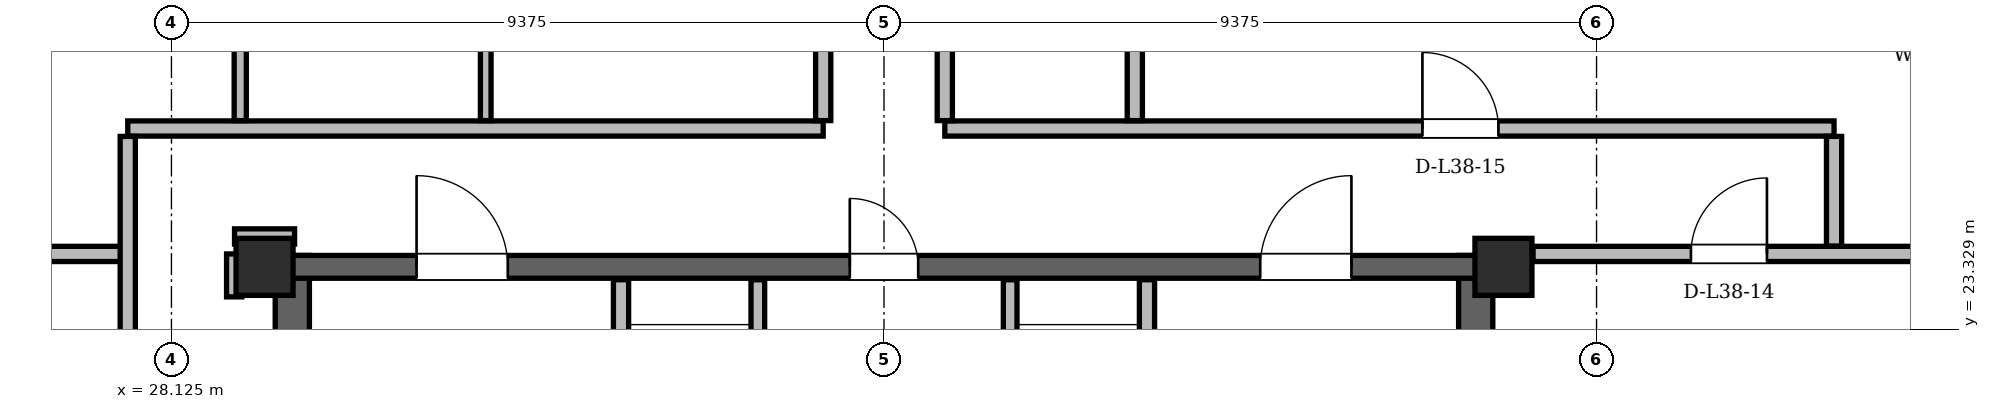
"""IFC4 building model, lengths in metres.
Left out: names, types, materials, properties, quantities, classifications, styles, units other than length and angle.
Written with IfcOpenShell. Run it as: python <this file> out.ifc"""

import sys

from ifc_helpers import new_model, si_unit, direction, frame, frame_2d, origin, origin_2d, place, context, subcontext, project, spatial, rectangle, hollow_rectangle, extrude, element, fill, save


model = new_model("IFC4")
c1 = context("Model", 3, precision=1e-05, world=origin(), true_north=direction((0.0, 1.0)))
c2 = subcontext(c1, "Body", "Model", "MODEL_VIEW")
j1 = project(units=[si_unit("LENGTHUNIT", "METRE"), si_unit("PLANEANGLEUNIT", "RADIAN")], contexts=[c1])
p1 = place(None, origin())
s1 = spatial("IfcSite", under=j1, at=p1, CompositionType="ELEMENT")
p2 = place(p1, origin())
s2 = spatial("IfcBuilding", under=s1, at=p2, CompositionType="ELEMENT")
p3 = place(p2, frame((0.0, 0.0, 145.8)))
s3 = spatial("IfcBuildingStorey", under=s2, at=p3, CompositionType="ELEMENT", Elevation=145.8)
for number, where, z_axis, x_axis in (
    (1, (45.65, 24.15, 0.0), (0.0, 0.0, 1.0), (1.0, 0.0, 0.0)),
    (2, (29.35, 24.15, 0.0), (0.0, 0.0, 1.0), (1.0, 0.0, 0.0)),
):
    element("IfcColumn", number, at=place(p3, frame(where, z_axis=z_axis, x_axis=x_axis)), inside=s3, PredefinedType="COLUMN", context=c2, shape_type="SweptSolid", body=[
        extrude(hollow_rectangle(XDim=0.75, YDim=0.75, WallThickness=0.06, at=origin_2d()), origin(), (0.0, 0.0, 1.0), 3.6),
    ])
for number, where, z_axis, x_axis in (
    (3, (29.715, 11.0, 0.0), (0.0, 0.0, 1.0), (0.0, 1.0, 0.0)),
    (4, (45.285, 11.0, 0.0), (0.0, 0.0, 1.0), (0.0, 1.0, 0.0)),
):
    element("IfcWall", number, at=place(p3, frame(where, z_axis=z_axis, x_axis=x_axis)), inside=s3, PredefinedType="SHEAR", context=c2, shape_type="SweptSolid", body=[
        extrude(rectangle(XDim=13.3, YDim=0.45, at=frame_2d((6.65, 0.0))), origin(), (0.0, 0.0, 1.0), 3.38),
    ])
p4 = place(p3, frame((29.65, 24.15, 0.0), z_axis=(0.0, 0.0, 1.0), x_axis=(1.0, 0.0, 0.0)))
e5 = element("IfcWall", 5, at=p4, inside=s3, PredefinedType="SHEAR", context=c2, shape_type="SweptSolid", body=[
    extrude(rectangle(XDim=15.7, YDim=0.3, at=frame_2d((7.85, 0.0))), origin(), (0.0, 0.0, 1.0), 3.38),
])
p5 = place(p4, frame((1.7, 0.0, 0.0)))
e6 = element("IfcOpeningElement", 6, at=p5, cuts=e5, PredefinedType="OPENING", context=c2, shape_type="SweptSolid", body=[
    extrude(rectangle(XDim=1.2, YDim=2.2, at=frame_2d((0.6, 1.1))), frame((0.0, 0.15, 0.0), z_axis=(0.0, -1.0, 0.0), x_axis=(1.0, 0.0, 0.0)), (0.0, 0.0, 1.0), 0.3),
])
p6 = place(p4, frame((12.8, 0.0, 0.0)))
e7 = element("IfcOpeningElement", 7, at=p6, cuts=e5, PredefinedType="OPENING", context=c2, shape_type="SweptSolid", body=[
    extrude(rectangle(XDim=1.2, YDim=2.2, at=frame_2d((0.6, 1.1))), frame((0.0, 0.15, 0.0), z_axis=(0.0, -1.0, 0.0), x_axis=(1.0, 0.0, 0.0)), (0.0, 0.0, 1.0), 0.3),
])
p7 = place(p4, frame((7.4, 0.0, 0.0)))
e8 = element("IfcOpeningElement", 8, at=p7, cuts=e5, PredefinedType="OPENING", context=c2, shape_type="SweptSolid", body=[
    extrude(rectangle(XDim=0.9, YDim=2.05, at=frame_2d((0.45, 1.025))), frame((0.0, 0.15, 0.0), z_axis=(0.0, -1.0, 0.0), x_axis=(1.0, 0.0, 0.0)), (0.0, 0.0, 1.0), 0.3),
])
p8 = place(p3, frame((60.052, 12.68, 0.0), z_axis=(0.0, 0.0, 1.0), x_axis=(-0.500002412417, 0.86602401097, 0.0)))
e9 = element("IfcWall", 9, at=p8, inside=s3, PredefinedType="SOLIDWALL", context=c2, shape_type="SweptSolid", body=[
    extrude(rectangle(XDim=35.404, YDim=0.34, at=frame_2d((17.702, 0.0))), origin(), (0.0, 0.0, 1.0), 2.6),
])
p9 = place(p8, frame((6.579, 0.0, 0.0)))
e10 = element("IfcOpeningElement", 10, at=p9, cuts=e9, PredefinedType="OPENING", context=c2, shape_type="SweptSolid", body=[
    extrude(rectangle(XDim=1.5, YDim=2.2, at=frame_2d((0.75, 1.1))), frame((0.0, 0.17, 0.0), z_axis=(0.0, -1.0, 0.0), x_axis=(1.0, 0.0, 0.0)), (0.0, 0.0, 1.0), 0.34),
])
p10 = place(p8, frame((25.869, 0.0, 0.0)))
e11 = element("IfcOpeningElement", 11, at=p10, cuts=e9, PredefinedType="OPENING", context=c2, shape_type="SweptSolid", body=[
    extrude(rectangle(XDim=1.5, YDim=2.2, at=frame_2d((0.75, 1.1))), frame((0.0, 0.17, 0.0), z_axis=(0.0, -1.0, 0.0), x_axis=(1.0, 0.0, 0.0)), (0.0, 0.0, 1.0), 0.34),
])
p11 = place(p8, frame((3.702, 0.0, 0.85)))
e12 = element("IfcOpeningElement", 12, at=p11, cuts=e9, PredefinedType="OPENING", context=c2, shape_type="SweptSolid", body=[
    extrude(rectangle(XDim=1.2, YDim=1.48, at=frame_2d((0.6, 0.74))), frame((0.0, 0.17, 0.0), z_axis=(0.0, -1.0, 0.0), x_axis=(1.0, 0.0, 0.0)), (0.0, 0.0, 1.0), 0.34),
])
p12 = place(p8, frame((11.88, 0.0, 0.85)))
e13 = element("IfcOpeningElement", 13, at=p12, cuts=e9, PredefinedType="OPENING", context=c2, shape_type="SweptSolid", body=[
    extrude(rectangle(XDim=1.2, YDim=1.48, at=frame_2d((0.6, 0.74))), frame((0.0, 0.17, 0.0), z_axis=(0.0, -1.0, 0.0), x_axis=(1.0, 0.0, 0.0)), (0.0, 0.0, 1.0), 0.34),
])
p13 = place(p8, frame((15.346, 0.0, 0.85)))
e14 = element("IfcOpeningElement", 14, at=p13, cuts=e9, PredefinedType="OPENING", context=c2, shape_type="SweptSolid", body=[
    extrude(rectangle(XDim=2.8, YDim=1.64, at=frame_2d((1.4, 0.82))), frame((0.0, 0.17, 0.0), z_axis=(0.0, -1.0, 0.0), x_axis=(1.0, 0.0, 0.0)), (0.0, 0.0, 1.0), 0.34),
])
p14 = place(p8, frame((32.288, 0.0, 0.85)))
e15 = element("IfcOpeningElement", 15, at=p14, cuts=e9, PredefinedType="OPENING", context=c2, shape_type="SweptSolid", body=[
    extrude(rectangle(XDim=2.0, YDim=1.64, at=frame_2d((1.0, 0.82))), frame((0.0, 0.17, 0.0), z_axis=(0.0, -1.0, 0.0), x_axis=(1.0, 0.0, 0.0)), (0.0, 0.0, 1.0), 0.34),
])
p15 = place(p3, frame((32.649, 43.341, 0.0), z_axis=(0.0, 0.0, 1.0), x_axis=(-0.500002412417, -0.86602401097, 0.0)))
e16 = element("IfcWall", 16, at=p15, inside=s3, PredefinedType="SOLIDWALL", context=c2, shape_type="SweptSolid", body=[
    extrude(rectangle(XDim=35.404, YDim=0.34, at=frame_2d((17.702, 0.0))), origin(), (0.0, 0.0, 1.0), 2.6),
])
p16 = place(p15, frame((6.579, 0.0, 0.0)))
e17 = element("IfcOpeningElement", 17, at=p16, cuts=e16, PredefinedType="OPENING", context=c2, shape_type="SweptSolid", body=[
    extrude(rectangle(XDim=1.5, YDim=2.2, at=frame_2d((0.75, 1.1))), frame((0.0, 0.17, 0.0), z_axis=(0.0, -1.0, 0.0), x_axis=(1.0, 0.0, 0.0)), (0.0, 0.0, 1.0), 0.34),
])
p17 = place(p15, frame((26.289, 0.0, 0.0)))
e18 = element("IfcOpeningElement", 18, at=p17, cuts=e16, PredefinedType="OPENING", context=c2, shape_type="SweptSolid", body=[
    extrude(rectangle(XDim=1.5, YDim=2.2, at=frame_2d((0.75, 1.1))), frame((0.0, 0.17, 0.0), z_axis=(0.0, -1.0, 0.0), x_axis=(1.0, 0.0, 0.0)), (0.0, 0.0, 1.0), 0.34),
])
p18 = place(p15, frame((22.194, 0.0, 0.85)))
e19 = element("IfcOpeningElement", 19, at=p18, cuts=e16, PredefinedType="OPENING", context=c2, shape_type="SweptSolid", body=[
    extrude(rectangle(XDim=1.2, YDim=1.48, at=frame_2d((0.6, 0.74))), frame((0.0, 0.17, 0.0), z_axis=(0.0, -1.0, 0.0), x_axis=(1.0, 0.0, 0.0)), (0.0, 0.0, 1.0), 0.34),
])
p19 = place(p15, frame((2.317, 0.0, 0.85)))
e20 = element("IfcOpeningElement", 20, at=p19, cuts=e16, PredefinedType="OPENING", context=c2, shape_type="SweptSolid", body=[
    extrude(rectangle(XDim=1.6, YDim=1.64, at=frame_2d((0.8, 0.82))), frame((0.0, 0.17, 0.0), z_axis=(0.0, -1.0, 0.0), x_axis=(1.0, 0.0, 0.0)), (0.0, 0.0, 1.0), 0.34),
])
p20 = place(p15, frame((12.951, 0.0, 0.85)))
e21 = element("IfcOpeningElement", 21, at=p20, cuts=e16, PredefinedType="OPENING", context=c2, shape_type="SweptSolid", body=[
    extrude(rectangle(XDim=3.0, YDim=1.64, at=frame_2d((1.5, 0.82))), frame((0.0, 0.17, 0.0), z_axis=(0.0, -1.0, 0.0), x_axis=(1.0, 0.0, 0.0)), (0.0, 0.0, 1.0), 0.34),
])
p21 = place(p15, frame((20.282, 0.0, 0.85)))
e22 = element("IfcOpeningElement", 22, at=p21, cuts=e16, PredefinedType="OPENING", context=c2, shape_type="SweptSolid", body=[
    extrude(rectangle(XDim=1.2, YDim=1.48, at=frame_2d((0.6, 0.74))), frame((0.0, 0.17, 0.0), z_axis=(0.0, -1.0, 0.0), x_axis=(1.0, 0.0, 0.0)), (0.0, 0.0, 1.0), 0.34),
])
p22 = place(p15, frame((33.524, 0.0, 0.85)))
e23 = element("IfcOpeningElement", 23, at=p22, cuts=e16, PredefinedType="OPENING", context=c2, shape_type="SweptSolid", body=[
    extrude(rectangle(XDim=1.2, YDim=1.48, at=frame_2d((0.6, 0.74))), frame((0.0, 0.17, 0.0), z_axis=(0.0, -1.0, 0.0), x_axis=(1.0, 0.0, 0.0)), (0.0, 0.0, 1.0), 0.34),
])
p23 = place(p3, frame((34.04, 19.48, 0.0), z_axis=(0.0, 0.0, 1.0), x_axis=(0.0, 1.0, 0.0)))
e24 = element("IfcWall", 24, at=p23, inside=s3, PredefinedType="PARTITIONING", context=c2, shape_type="SweptSolid", body=[
    extrude(rectangle(XDim=4.5, YDim=0.2, at=frame_2d((2.25, 0.0))), origin(), (0.0, 0.0, 1.0), 2.42),
])
p24 = place(p23, frame((2.12, 0.0, 0.0)))
e25 = element("IfcOpeningElement", 25, at=p24, cuts=e24, PredefinedType="OPENING", context=c2, shape_type="SweptSolid", body=[
    extrude(rectangle(XDim=1.1, YDim=2.2, at=frame_2d((0.55, 1.1))), frame((0.0, 0.1, 0.0), z_axis=(0.0, -1.0, 0.0), x_axis=(1.0, 0.0, 0.0)), (0.0, 0.0, 1.0), 0.2),
])
p25 = place(p3, frame((35.84, 20.96, 0.0), z_axis=(0.0, 0.0, 1.0), x_axis=(0.0, 1.0, 0.0)))
e26 = element("IfcWall", 26, at=p25, inside=s3, PredefinedType="PARTITIONING", context=c2, shape_type="SweptSolid", body=[
    extrude(rectangle(XDim=3.02, YDim=0.18, at=frame_2d((1.51, 0.0))), origin(), (0.0, 0.0, 1.0), 2.42),
])
p26 = place(p3, frame((40.96, 19.48, 0.0), z_axis=(0.0, 0.0, 1.0), x_axis=(0.0, 1.0, 0.0)))
e27 = element("IfcWall", 27, at=p26, inside=s3, PredefinedType="PARTITIONING", context=c2, shape_type="SweptSolid", body=[
    extrude(rectangle(XDim=4.5, YDim=0.2, at=frame_2d((2.25, 0.0))), origin(), (0.0, 0.0, 1.0), 2.42),
])
p27 = place(p26, frame((2.12, 0.0, 0.0)))
e28 = element("IfcOpeningElement", 28, at=p27, cuts=e27, PredefinedType="OPENING", context=c2, shape_type="SweptSolid", body=[
    extrude(rectangle(XDim=1.1, YDim=2.2, at=frame_2d((0.55, 1.1))), frame((0.0, 0.1, 0.0), z_axis=(0.0, -1.0, 0.0), x_axis=(1.0, 0.0, 0.0)), (0.0, 0.0, 1.0), 0.2),
])
p28 = place(p3, frame((39.16, 20.96, 0.0), z_axis=(0.0, 0.0, 1.0), x_axis=(0.0, 1.0, 0.0)))
e29 = element("IfcWall", 29, at=p28, inside=s3, PredefinedType="PARTITIONING", context=c2, shape_type="SweptSolid", body=[
    extrude(rectangle(XDim=3.02, YDim=0.18, at=frame_2d((1.51, 0.0))), origin(), (0.0, 0.0, 1.0), 2.42),
])
p29 = place(p3, frame((21.869, 24.32, 0.0), z_axis=(0.0, 0.0, 1.0), x_axis=(1.0, 0.0, 0.0)))
e30 = element("IfcWall", 30, at=p29, inside=s3, PredefinedType="PARTITIONING", context=c2, shape_type="SweptSolid", body=[
    extrude(rectangle(XDim=5.681, YDim=0.2, at=frame_2d((2.841, 0.0))), origin(), (0.0, 0.0, 1.0), 3.38),
])
p30 = place(p3, frame((46.04, 24.32, 0.0), z_axis=(0.0, 0.0, 1.0), x_axis=(1.0, 0.0, 0.0)))
e31 = element("IfcWall", 31, at=p30, inside=s3, PredefinedType="PARTITIONING", context=c2, shape_type="SweptSolid", body=[
    extrude(rectangle(XDim=7.091, YDim=0.2, at=frame_2d((3.546, 0.0))), origin(), (0.0, 0.0, 1.0), 3.38),
])
p31 = place(p30, frame((2.077, 0.0, 0.0)))
e32 = element("IfcOpeningElement", 32, at=p31, cuts=e31, PredefinedType="OPENING", context=c2, shape_type="SweptSolid", body=[
    extrude(rectangle(XDim=1.0, YDim=2.18, at=frame_2d((0.5, 1.09))), frame((0.0, 0.1, 0.0), z_axis=(0.0, -1.0, 0.0), x_axis=(1.0, 0.0, 0.0)), (0.0, 0.0, 1.0), 0.2),
])
p32 = place(p3, frame((28.955, 24.55, 0.0), z_axis=(0.0, 0.0, 1.0), x_axis=(1.0, 0.0, 0.0)))
e33 = element("IfcWall", 33, at=p32, inside=s3, PredefinedType="PARTITIONING", context=c2, shape_type="SweptSolid", body=[
    extrude(rectangle(XDim=0.79, YDim=0.2, at=frame_2d((0.395, 0.0))), origin(), (0.0, 0.0, 1.0), 2.842),
])
p33 = place(p3, frame((27.55, 25.97, 0.0), z_axis=(0.0, 0.0, 1.0), x_axis=(1.0, 0.0, 0.0)))
e34 = element("IfcWall", 34, at=p33, inside=s3, PredefinedType="PARTITIONING", context=c2, shape_type="SweptSolid", body=[
    extrude(rectangle(XDim=9.15, YDim=0.2, at=frame_2d((4.575, 0.0))), origin(), (0.0, 0.0, 1.0), 2.842),
])
p34 = place(p3, frame((38.3, 25.97, 0.0), z_axis=(0.0, 0.0, 1.0), x_axis=(1.0, 0.0, 0.0)))
e35 = element("IfcWall", 35, at=p34, inside=s3, PredefinedType="PARTITIONING", context=c2, shape_type="SweptSolid", body=[
    extrude(rectangle(XDim=11.7, YDim=0.2, at=frame_2d((5.85, 0.0))), origin(), (0.0, 0.0, 1.0), 2.842),
])
p35 = place(p34, frame((6.284, 0.0, 0.0)))
e36 = element("IfcOpeningElement", 36, at=p35, cuts=e35, PredefinedType="OPENING", context=c2, shape_type="SweptSolid", body=[
    extrude(rectangle(XDim=1.0, YDim=2.18, at=frame_2d((0.5, 1.09))), frame((0.0, 0.1, 0.0), z_axis=(0.0, -1.0, 0.0), x_axis=(1.0, 0.0, 0.0)), (0.0, 0.0, 1.0), 0.2),
])
p36 = place(p3, frame((27.55, 18.554, 0.0), z_axis=(0.0, 0.0, 1.0), x_axis=(0.0, 1.0, 0.0)))
e37 = element("IfcWall", 37, at=p36, inside=s3, PredefinedType="PARTITIONING", context=c2, shape_type="SweptSolid", body=[
    extrude(rectangle(XDim=7.312, YDim=0.2, at=frame_2d((3.656, 0.0))), origin(), (0.0, 0.0, 1.0), 3.38),
])
p37 = place(p3, frame((28.95, 23.755, 0.0), z_axis=(0.0, 0.0, 1.0), x_axis=(0.0, 1.0, 0.0)))
e38 = element("IfcWall", 38, at=p37, inside=s3, PredefinedType="PARTITIONING", context=c2, shape_type="SweptSolid", body=[
    extrude(rectangle(XDim=0.565, YDim=0.2, at=frame_2d((0.283, 0.0))), origin(), (0.0, 0.0, 1.0), 3.38),
])
p38 = place(p3, frame((29.03, 26.074, 0.0), z_axis=(0.0, 0.0, 1.0), x_axis=(0.0, 1.0, 0.0)))
e39 = element("IfcWall", 39, at=p38, inside=s3, PredefinedType="PARTITIONING", context=c2, shape_type="SweptSolid", body=[
    extrude(rectangle(XDim=1.822, YDim=0.16, at=frame_2d((0.911, 0.0))), origin(), (0.0, 0.0, 1.0), 3.38),
])
p39 = place(p3, frame((32.26, 26.074, 0.0), z_axis=(0.0, 0.0, 1.0), x_axis=(0.0, 1.0, 0.0)))
e40 = element("IfcWall", 40, at=p39, inside=s3, PredefinedType="PARTITIONING", context=c2, shape_type="SweptSolid", body=[
    extrude(rectangle(XDim=1.822, YDim=0.14, at=frame_2d((0.911, 0.0))), origin(), (0.0, 0.0, 1.0), 3.38),
])
p40 = place(p3, frame((36.7, 26.074, 0.0), z_axis=(0.0, 0.0, 1.0), x_axis=(0.0, 1.0, 0.0)))
e41 = element("IfcWall", 41, at=p40, inside=s3, PredefinedType="PARTITIONING", context=c2, shape_type="SweptSolid", body=[
    extrude(rectangle(XDim=17.093, YDim=0.2, at=frame_2d((8.546, 0.0))), origin(), (0.0, 0.0, 1.0), 3.38),
])
p41 = place(p40, frame((7.042, 0.0, 0.0)))
e42 = element("IfcOpeningElement", 42, at=p41, cuts=e41, PredefinedType="OPENING", context=c2, shape_type="SweptSolid", body=[
    extrude(rectangle(XDim=1.0, YDim=2.18, at=frame_2d((0.5, 1.09))), frame((0.0, 0.1, 0.0), z_axis=(0.0, -1.0, 0.0), x_axis=(1.0, 0.0, 0.0)), (0.0, 0.0, 1.0), 0.2),
])
p42 = place(p3, frame((38.3, 26.074, 0.0), z_axis=(0.0, 0.0, 1.0), x_axis=(0.0, 1.0, 0.0)))
e43 = element("IfcWall", 43, at=p42, inside=s3, PredefinedType="PARTITIONING", context=c2, shape_type="SweptSolid", body=[
    extrude(rectangle(XDim=13.422, YDim=0.2, at=frame_2d((6.711, 0.0))), origin(), (0.0, 0.0, 1.0), 3.38),
])
p43 = place(p42, frame((8.527, 0.0, 0.0)))
e44 = element("IfcOpeningElement", 44, at=p43, cuts=e43, PredefinedType="OPENING", context=c2, shape_type="SweptSolid", body=[
    extrude(rectangle(XDim=1.0, YDim=2.18, at=frame_2d((0.5, 1.09))), frame((0.0, 0.1, 0.0), z_axis=(0.0, -1.0, 0.0), x_axis=(1.0, 0.0, 0.0)), (0.0, 0.0, 1.0), 0.2),
])
p44 = place(p3, frame((40.8, 26.074, 0.0), z_axis=(0.0, 0.0, 1.0), x_axis=(0.0, 1.0, 0.0)))
e45 = element("IfcWall", 45, at=p44, inside=s3, PredefinedType="PARTITIONING", context=c2, shape_type="SweptSolid", body=[
    extrude(rectangle(XDim=17.093, YDim=0.2, at=frame_2d((8.546, 0.0))), origin(), (0.0, 0.0, 1.0), 3.38),
])
p45 = place(p3, frame((50.0, 24.424, 0.0), z_axis=(0.0, 0.0, 1.0), x_axis=(0.0, 1.0, 0.0)))
e46 = element("IfcWall", 46, at=p45, inside=s3, PredefinedType="PARTITIONING", context=c2, shape_type="SweptSolid", body=[
    extrude(rectangle(XDim=1.442, YDim=0.2, at=frame_2d((0.721, 0.0))), origin(), (0.0, 0.0, 1.0), 3.38),
])
p46 = place(p13, origin())
e47 = element("IfcWindow", 47, at=p46, inside=s3, PartitioningType="SINGLE_PANEL", PredefinedType="WINDOW", context=c2, shape_type="SweptSolid", body=[
    extrude(rectangle(XDim=2.8, YDim=1.64, at=frame_2d((1.4, 0.82))), frame((0.0, 0.03, 0.0), z_axis=(0.0, -1.0, 0.0), x_axis=(1.0, 0.0, 0.0)), (0.0, 0.0, 1.0), 0.06),
])
fill(e14, e47)
p47 = place(p5, origin())
e48 = element("IfcDoor", 48, at=p47, inside=s3, OperationType="SINGLE_SWING_LEFT", PredefinedType="DOOR", context=c2, shape_type="SweptSolid", body=[
    extrude(rectangle(XDim=1.2, YDim=2.2, at=frame_2d((0.6, 1.1))), frame((0.0, 0.025, 0.0), z_axis=(0.0, -1.0, 0.0), x_axis=(1.0, 0.0, 0.0)), (0.0, 0.0, 1.0), 0.05),
])
fill(e6, e48)
p48 = place(p6, origin())
e49 = element("IfcDoor", 49, at=p48, inside=s3, OperationType="SINGLE_SWING_RIGHT", PredefinedType="DOOR", context=c2, shape_type="SweptSolid", body=[
    extrude(rectangle(XDim=1.2, YDim=2.2, at=frame_2d((0.6, 1.1))), frame((0.0, 0.025, 0.0), z_axis=(0.0, -1.0, 0.0), x_axis=(1.0, 0.0, 0.0)), (0.0, 0.0, 1.0), 0.05),
])
fill(e7, e49)
p49 = place(p7, origin())
e50 = element("IfcDoor", 50, at=p49, inside=s3, OperationType="SINGLE_SWING_LEFT", PredefinedType="DOOR", context=c2, shape_type="SweptSolid", body=[
    extrude(rectangle(XDim=0.9, YDim=2.05, at=frame_2d((0.45, 1.025))), frame((0.0, 0.025, 0.0), z_axis=(0.0, -1.0, 0.0), x_axis=(1.0, 0.0, 0.0)), (0.0, 0.0, 1.0), 0.05),
])
fill(e8, e50)
p50 = place(p31, origin())
e51 = element("IfcDoor", 51, at=p50, inside=s3, OperationType="SINGLE_SWING_RIGHT", PredefinedType="DOOR", context=c2, shape_type="SweptSolid", body=[
    extrude(rectangle(XDim=1.0, YDim=2.18, at=frame_2d((0.5, 1.09))), frame((0.0, 0.025, 0.0), z_axis=(0.0, -1.0, 0.0), x_axis=(1.0, 0.0, 0.0)), (0.0, 0.0, 1.0), 0.05),
])
fill(e32, e51)
p51 = place(p35, origin())
e52 = element("IfcDoor", 52, at=p51, inside=s3, OperationType="SINGLE_SWING_LEFT", PredefinedType="DOOR", context=c2, shape_type="SweptSolid", body=[
    extrude(rectangle(XDim=1.0, YDim=2.18, at=frame_2d((0.5, 1.09))), frame((0.0, 0.025, 0.0), z_axis=(0.0, -1.0, 0.0), x_axis=(1.0, 0.0, 0.0)), (0.0, 0.0, 1.0), 0.05),
])
fill(e36, e52)
save(model, sys.argv[1])
